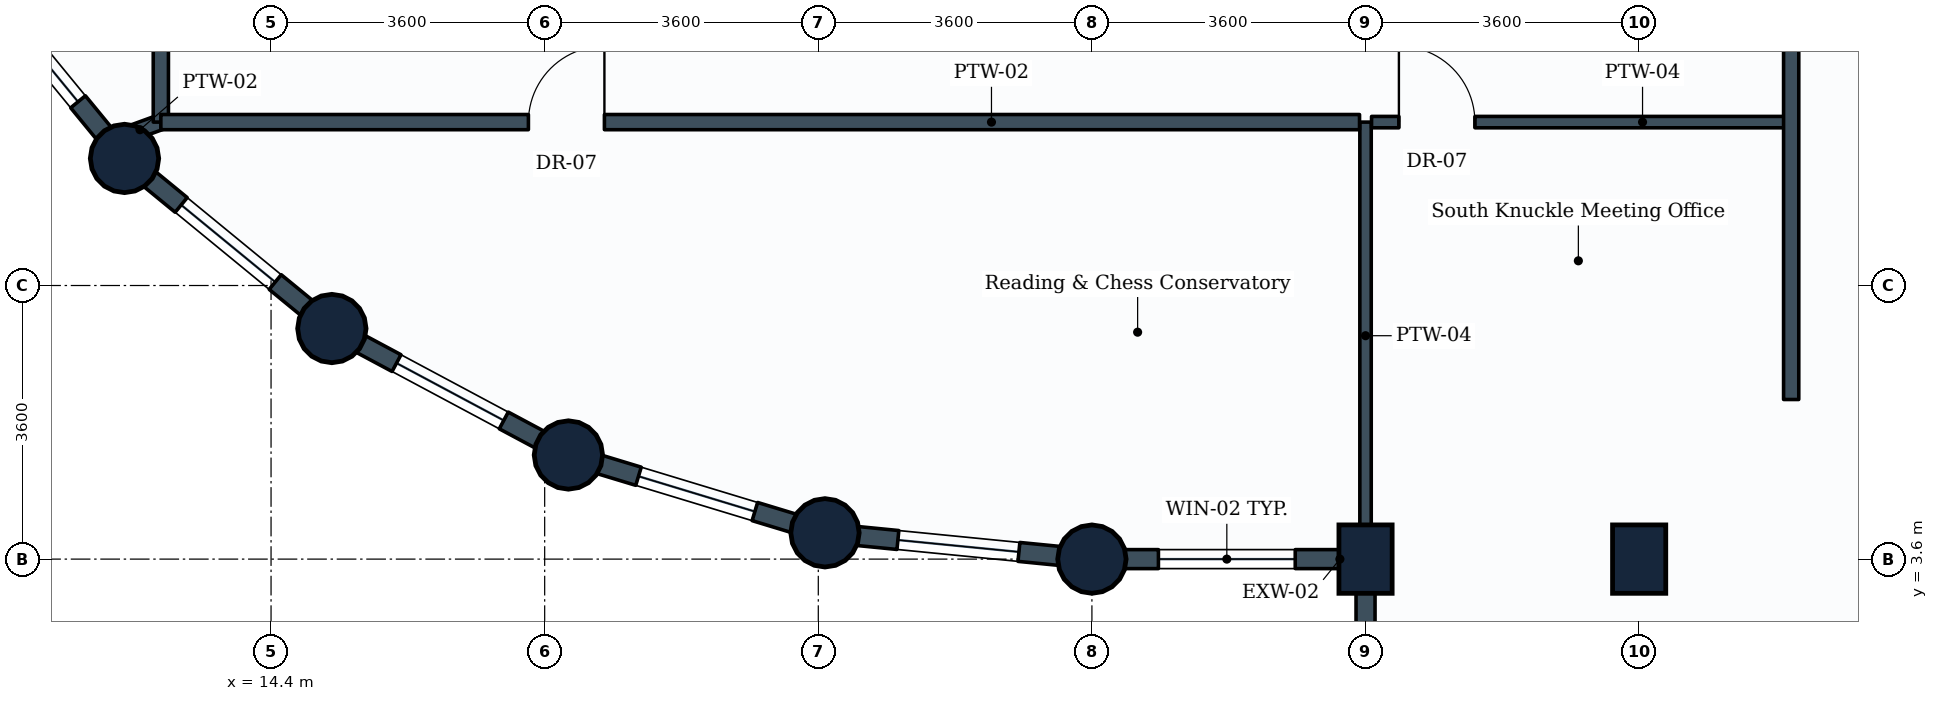
"""IFC4 building model, lengths in metres.
Left out: names, types, materials, properties, quantities, classifications, styles, units other than length and angle.
Written with IfcOpenShell. Run it as: python <this file> out.ifc"""

import sys

from ifc_helpers import new_model, si_unit, direction, frame, frame_2d, origin, origin_2d, place, context, subcontext, project, spatial, rectangle, circle, extrude, element, fill, save


model = new_model("IFC4")
c1 = context("Model", 3, precision=1e-05, world=origin(), true_north=direction((0.0, 1.0)))
c2 = subcontext(c1, "Body", "Model", "MODEL_VIEW")
j1 = project(units=[si_unit("LENGTHUNIT", "METRE"), si_unit("PLANEANGLEUNIT", "RADIAN")], contexts=[c1])
p1 = place(None, origin())
s1 = spatial("IfcSite", under=j1, at=p1, CompositionType="ELEMENT")
p2 = place(p1, origin())
s2 = spatial("IfcBuilding", under=s1, at=p2, CompositionType="ELEMENT")
p3 = place(p2, frame((0.0, 0.0, 174.8)))
s3 = spatial("IfcBuildingStorey", under=s2, at=p3, CompositionType="ELEMENT", Elevation=174.8)
for number, where, z_axis, x_axis in (
    (1, (12.472, 8.872, 0.0), (0.0, 0.0, 1.0), (1.0, 0.0, 0.0)),
    (2, (15.2, 6.634, 0.0), (0.0, 0.0, 1.0), (1.0, 0.0, 0.0)),
    (3, (18.312, 4.97, 0.0), (0.0, 0.0, 1.0), (1.0, 0.0, 0.0)),
    (4, (21.688, 3.946, 0.0), (0.0, 0.0, 1.0), (1.0, 0.0, 0.0)),
    (5, (25.2, 3.6, 0.0), (0.0, 0.0, 1.0), (1.0, 0.0, 0.0)),
):
    element("IfcColumn", number, at=place(p3, frame(where, z_axis=z_axis, x_axis=x_axis)), inside=s3, PredefinedType="COLUMN", context=c2, shape_type="SweptSolid", body=[
        extrude(circle(Radius=0.45, at=origin_2d()), origin(), (0.0, 0.0, 1.0), 3.8),
    ])
for number, where, z_axis, x_axis in (
    (6, (28.8, 3.6, 0.0), (0.0, 0.0, 1.0), (1.0, 0.0, 0.0)),
    (7, (32.4, 3.6, 0.0), (0.0, 0.0, 1.0), (1.0, 0.0, 0.0)),
):
    element("IfcColumn", number, at=place(p3, frame(where, z_axis=z_axis, x_axis=x_axis)), inside=s3, PredefinedType="COLUMN", context=c2, shape_type="SweptSolid", body=[
        extrude(rectangle(XDim=0.7, YDim=0.9, at=origin_2d()), origin(), (0.0, 0.0, 1.0), 3.8),
    ])
p4 = place(p3, frame((28.8, 3.6, 0.0), z_axis=(0.0, 0.0, 1.0), x_axis=(-1.0, 0.0, 0.0)))
e8 = element("IfcWall", 8, at=p4, inside=s3, PredefinedType="STANDARD", context=c2, shape_type="SweptSolid", body=[
    extrude(rectangle(XDim=3.6, YDim=0.25, at=frame_2d((1.8, 0.0))), origin(), (0.0, 0.0, 1.0), 2.93),
])
p5 = place(p4, frame((0.925, 0.0, 0.85)))
e9 = element("IfcOpeningElement", 9, at=p5, cuts=e8, PredefinedType="OPENING", context=c2, shape_type="SweptSolid", body=[
    extrude(rectangle(XDim=1.8, YDim=1.35, at=frame_2d((0.9, 0.675))), frame((0.0, 0.135, 0.0), z_axis=(0.0, -1.0, 0.0), x_axis=(1.0, 0.0, 0.0)), (0.0, 0.0, 1.0), 0.27),
])
p6 = place(p3, frame((28.8, 3.6, 0.0), z_axis=(0.0, 0.0, 1.0), x_axis=(0.0, -1.0, 0.0)))
e10 = element("IfcWall", 10, at=p6, inside=s3, PredefinedType="STANDARD", context=c2, shape_type="SweptSolid", body=[
    extrude(rectangle(XDim=2.1, YDim=0.25, at=frame_2d((1.05, 0.0))), origin(), (0.0, 0.0, 1.0), 2.93),
])
p7 = place(p3, frame((12.472, 8.872, 0.0), z_axis=(0.0, 0.0, 1.0), x_axis=(-0.634258295121, 0.773121216285, 0.0)))
e11 = element("IfcWall", 11, at=p7, inside=s3, PredefinedType="STANDARD", context=c2, shape_type="SweptSolid", body=[
    extrude(rectangle(XDim=3.529, YDim=0.25, at=frame_2d((1.764, 0.0))), origin(), (0.0, 0.0, 1.0), 2.93),
])
p8 = place(p7, frame((0.964, 0.0, 0.85)))
e12 = element("IfcOpeningElement", 12, at=p8, cuts=e11, PredefinedType="OPENING", context=c2, shape_type="SweptSolid", body=[
    extrude(rectangle(XDim=1.6, YDim=1.35, at=frame_2d((0.8, 0.675))), frame((0.0, 0.135, 0.0), z_axis=(0.0, -1.0, 0.0), x_axis=(1.0, 0.0, 0.0)), (0.0, 0.0, 1.0), 0.27),
])
p9 = place(p3, frame((15.2, 6.634, 0.0), z_axis=(0.0, 0.0, 1.0), x_axis=(-0.773121216285, 0.634258295121, 0.0)))
e13 = element("IfcWall", 13, at=p9, inside=s3, PredefinedType="STANDARD", context=c2, shape_type="SweptSolid", body=[
    extrude(rectangle(XDim=3.529, YDim=0.25, at=frame_2d((1.764, 0.0))), origin(), (0.0, 0.0, 1.0), 2.93),
])
p10 = place(p9, frame((0.964, 0.0, 0.85)))
e14 = element("IfcOpeningElement", 14, at=p10, cuts=e13, PredefinedType="OPENING", context=c2, shape_type="SweptSolid", body=[
    extrude(rectangle(XDim=1.6, YDim=1.35, at=frame_2d((0.8, 0.675))), frame((0.0, 0.135, 0.0), z_axis=(0.0, -1.0, 0.0), x_axis=(1.0, 0.0, 0.0)), (0.0, 0.0, 1.0), 0.27),
])
p11 = place(p3, frame((18.312, 4.97, 0.0), z_axis=(0.0, 0.0, 1.0), x_axis=(-0.881846862014, 0.471535907389, 0.0)))
e15 = element("IfcWall", 15, at=p11, inside=s3, PredefinedType="STANDARD", context=c2, shape_type="SweptSolid", body=[
    extrude(rectangle(XDim=3.529, YDim=0.25, at=frame_2d((1.765, 0.0))), origin(), (0.0, 0.0, 1.0), 2.93),
])
p12 = place(p11, frame((0.964, 0.0, 0.85)))
e16 = element("IfcOpeningElement", 16, at=p12, cuts=e15, PredefinedType="OPENING", context=c2, shape_type="SweptSolid", body=[
    extrude(rectangle(XDim=1.6, YDim=1.35, at=frame_2d((0.8, 0.675))), frame((0.0, 0.135, 0.0), z_axis=(0.0, -1.0, 0.0), x_axis=(1.0, 0.0, 0.0)), (0.0, 0.0, 1.0), 0.27),
])
p13 = place(p3, frame((21.688, 3.946, 0.0), z_axis=(0.0, 0.0, 1.0), x_axis=(-0.956953367403, 0.290241714123, 0.0)))
e17 = element("IfcWall", 17, at=p13, inside=s3, PredefinedType="STANDARD", context=c2, shape_type="SweptSolid", body=[
    extrude(rectangle(XDim=3.528, YDim=0.25, at=frame_2d((1.764, 0.0))), origin(), (0.0, 0.0, 1.0), 2.93),
])
p14 = place(p13, frame((0.964, 0.0, 0.85)))
e18 = element("IfcOpeningElement", 18, at=p14, cuts=e17, PredefinedType="OPENING", context=c2, shape_type="SweptSolid", body=[
    extrude(rectangle(XDim=1.6, YDim=1.35, at=frame_2d((0.8, 0.675))), frame((0.0, 0.135, 0.0), z_axis=(0.0, -1.0, 0.0), x_axis=(1.0, 0.0, 0.0)), (0.0, 0.0, 1.0), 0.27),
])
p15 = place(p3, frame((25.2, 3.6, 0.0), z_axis=(0.0, 0.0, 1.0), x_axis=(-0.995183369056, 0.098030923459, 0.0)))
e19 = element("IfcWall", 19, at=p15, inside=s3, PredefinedType="STANDARD", context=c2, shape_type="SweptSolid", body=[
    extrude(rectangle(XDim=3.529, YDim=0.25, at=frame_2d((1.765, 0.0))), origin(), (0.0, 0.0, 1.0), 2.93),
])
p16 = place(p15, frame((0.965, 0.0, 0.85)))
e20 = element("IfcOpeningElement", 20, at=p16, cuts=e19, PredefinedType="OPENING", context=c2, shape_type="SweptSolid", body=[
    extrude(rectangle(XDim=1.6, YDim=1.35, at=frame_2d((0.8, 0.675))), frame((0.0, 0.135, 0.0), z_axis=(0.0, -1.0, 0.0), x_axis=(1.0, 0.0, 0.0)), (0.0, 0.0, 1.0), 0.27),
])
p17 = place(p3, frame((28.8, 9.35, 0.0), z_axis=(0.0, 0.0, 1.0), x_axis=(0.0, -1.0, 0.0)))
e21 = element("IfcWall", 21, at=p17, inside=s3, PredefinedType="PARTITIONING", context=c2, shape_type="SweptSolid", body=[
    extrude(rectangle(XDim=5.621, YDim=0.15, at=frame_2d((2.811, 0.0))), origin(), (0.0, 0.0, 1.0), 3.535),
])
p18 = place(p3, frame((12.95, 9.35, 0.0), z_axis=(0.0, 0.0, 1.0), x_axis=(-0.939585793139, -0.342313507376, 0.0)))
e22 = element("IfcWall", 22, at=p18, inside=s3, PredefinedType="PARTITIONING", context=c2, shape_type="SweptSolid", body=[
    extrude(rectangle(XDim=0.584, YDim=0.2, at=frame_2d((0.292, 0.0))), origin(), (0.0, 0.0, 1.0), 2.93),
])
p19 = place(p3, frame((12.95, 9.35, 0.0), z_axis=(0.0, 0.0, 1.0), x_axis=(0.0, 1.0, 0.0)))
e23 = element("IfcWall", 23, at=p19, inside=s3, PredefinedType="PARTITIONING", context=c2, shape_type="SweptSolid", body=[
    extrude(rectangle(XDim=15.771, YDim=0.2, at=frame_2d((7.885, 0.0))), origin(), (0.0, 0.0, 1.0), 3.17),
])
p20 = place(p19, frame((6.99, 0.0, 0.0)))
e24 = element("IfcOpeningElement", 24, at=p20, cuts=e23, PredefinedType="OPENING", context=c2, shape_type="SweptSolid", body=[
    extrude(rectangle(XDim=1.0, YDim=2.1, at=frame_2d((0.5, 1.05))), frame((0.0, 0.11, 0.0), z_axis=(0.0, -1.0, 0.0), x_axis=(1.0, 0.0, 0.0)), (0.0, 0.0, 1.0), 0.22),
])
p21 = place(p3, frame((12.95, 9.35, 0.0), z_axis=(0.0, 0.0, 1.0), x_axis=(1.0, 0.0, 0.0)))
e25 = element("IfcWall", 25, at=p21, inside=s3, PredefinedType="PARTITIONING", context=c2, shape_type="SweptSolid", body=[
    extrude(rectangle(XDim=15.771, YDim=0.2, at=frame_2d((7.885, 0.0))), origin(), (0.0, 0.0, 1.0), 3.17),
])
p22 = place(p21, frame((4.836, 0.0, 0.0)))
e26 = element("IfcOpeningElement", 26, at=p22, cuts=e25, PredefinedType="OPENING", context=c2, shape_type="SweptSolid", body=[
    extrude(rectangle(XDim=1.0, YDim=2.1, at=frame_2d((0.5, 1.05))), frame((0.0, 0.11, 0.0), z_axis=(0.0, -1.0, 0.0), x_axis=(1.0, 0.0, 0.0)), (0.0, 0.0, 1.0), 0.22),
])
p23 = place(p3, frame((28.879, 9.35, 0.0), z_axis=(0.0, 0.0, 1.0), x_axis=(1.0, 0.0, 0.0)))
e27 = element("IfcWall", 27, at=p23, inside=s3, PredefinedType="PARTITIONING", context=c2, shape_type="SweptSolid", body=[
    extrude(rectangle(XDim=5.521, YDim=0.15, at=frame_2d((2.76, 0.0))), origin(), (0.0, 0.0, 1.0), 3.535),
])
p24 = place(p23, frame((0.36, 0.0, 0.0)))
e28 = element("IfcOpeningElement", 28, at=p24, cuts=e27, PredefinedType="OPENING", context=c2, shape_type="SweptSolid", body=[
    extrude(rectangle(XDim=1.0, YDim=2.1, at=frame_2d((0.5, 1.05))), frame((0.0, 0.085, 0.0), z_axis=(0.0, -1.0, 0.0), x_axis=(1.0, 0.0, 0.0)), (0.0, 0.0, 1.0), 0.17),
])
p25 = place(p3, frame((34.4, 5.7, 0.0), z_axis=(0.0, 0.0, 1.0), x_axis=(0.0, 1.0, 0.0)))
e29 = element("IfcWall", 29, at=p25, inside=s3, PredefinedType="PARTITIONING", context=c2, shape_type="SweptSolid", body=[
    extrude(rectangle(XDim=10.6, YDim=0.2, at=frame_2d((5.3, 0.0))), origin(), (0.0, 0.0, 1.0), 3.17),
])
p26 = place(p5, origin())
e30 = element("IfcWindow", 30, at=p26, inside=s3, PartitioningType="SINGLE_PANEL", PredefinedType="WINDOW", context=c2, shape_type="SweptSolid", body=[
    extrude(rectangle(XDim=1.8, YDim=1.35, at=frame_2d((0.9, 0.675))), frame((0.0, 0.03, 0.0), z_axis=(0.0, -1.0, 0.0), x_axis=(1.0, 0.0, 0.0)), (0.0, 0.0, 1.0), 0.06),
])
fill(e9, e30)
p27 = place(p8, origin())
e31 = element("IfcWindow", 31, at=p27, inside=s3, PartitioningType="SINGLE_PANEL", PredefinedType="WINDOW", context=c2, shape_type="SweptSolid", body=[
    extrude(rectangle(XDim=1.6, YDim=1.35, at=frame_2d((0.8, 0.675))), frame((0.0, 0.03, 0.0), z_axis=(0.0, -1.0, 0.0), x_axis=(1.0, 0.0, 0.0)), (0.0, 0.0, 1.0), 0.06),
])
fill(e12, e31)
p28 = place(p10, origin())
e32 = element("IfcWindow", 32, at=p28, inside=s3, PartitioningType="SINGLE_PANEL", PredefinedType="WINDOW", context=c2, shape_type="SweptSolid", body=[
    extrude(rectangle(XDim=1.6, YDim=1.35, at=frame_2d((0.8, 0.675))), frame((0.0, 0.03, 0.0), z_axis=(0.0, -1.0, 0.0), x_axis=(1.0, 0.0, 0.0)), (0.0, 0.0, 1.0), 0.06),
])
fill(e14, e32)
p29 = place(p12, origin())
e33 = element("IfcWindow", 33, at=p29, inside=s3, PartitioningType="SINGLE_PANEL", PredefinedType="WINDOW", context=c2, shape_type="SweptSolid", body=[
    extrude(rectangle(XDim=1.6, YDim=1.35, at=frame_2d((0.8, 0.675))), frame((0.0, 0.03, 0.0), z_axis=(0.0, -1.0, 0.0), x_axis=(1.0, 0.0, 0.0)), (0.0, 0.0, 1.0), 0.06),
])
fill(e16, e33)
p30 = place(p14, origin())
e34 = element("IfcWindow", 34, at=p30, inside=s3, PartitioningType="SINGLE_PANEL", PredefinedType="WINDOW", context=c2, shape_type="SweptSolid", body=[
    extrude(rectangle(XDim=1.6, YDim=1.35, at=frame_2d((0.8, 0.675))), frame((0.0, 0.03, 0.0), z_axis=(0.0, -1.0, 0.0), x_axis=(1.0, 0.0, 0.0)), (0.0, 0.0, 1.0), 0.06),
])
fill(e18, e34)
p31 = place(p16, origin())
e35 = element("IfcWindow", 35, at=p31, inside=s3, PartitioningType="SINGLE_PANEL", PredefinedType="WINDOW", context=c2, shape_type="SweptSolid", body=[
    extrude(rectangle(XDim=1.6, YDim=1.35, at=frame_2d((0.8, 0.675))), frame((0.0, 0.03, 0.0), z_axis=(0.0, -1.0, 0.0), x_axis=(1.0, 0.0, 0.0)), (0.0, 0.0, 1.0), 0.06),
])
fill(e20, e35)
p32 = place(p22, origin())
e36 = element("IfcDoor", 36, at=p32, inside=s3, OperationType="SINGLE_SWING_RIGHT", PredefinedType="DOOR", context=c2, shape_type="SweptSolid", body=[
    extrude(rectangle(XDim=1.0, YDim=2.1, at=frame_2d((0.5, 1.05))), frame((0.0, 0.025, 0.0), z_axis=(0.0, -1.0, 0.0), x_axis=(1.0, 0.0, 0.0)), (0.0, 0.0, 1.0), 0.05),
])
fill(e26, e36)
p33 = place(p24, origin())
e37 = element("IfcDoor", 37, at=p33, inside=s3, OperationType="SINGLE_SWING_LEFT", PredefinedType="DOOR", context=c2, shape_type="SweptSolid", body=[
    extrude(rectangle(XDim=1.0, YDim=2.1, at=frame_2d((0.5, 1.05))), frame((0.0, 0.025, 0.0), z_axis=(0.0, -1.0, 0.0), x_axis=(1.0, 0.0, 0.0)), (0.0, 0.0, 1.0), 0.05),
])
fill(e28, e37)
save(model, sys.argv[1])
